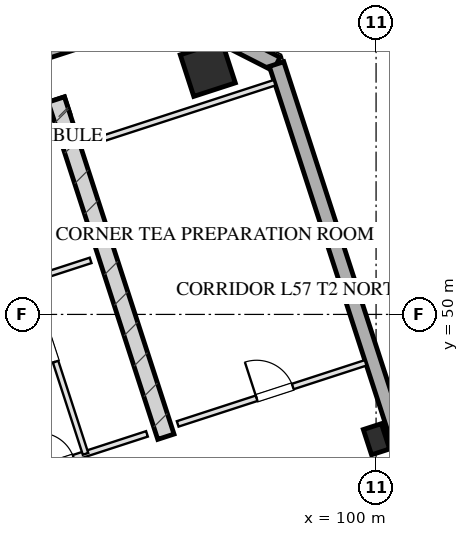
"""IFC4 building model, lengths in metres.
Left out: names, types, materials, properties, quantities, classifications, styles, units other than length and angle.
Written with IfcOpenShell. Run it as: python <this file> out.ifc"""

import sys

from ifc_helpers import new_model, si_unit, direction, frame, frame_2d, origin, origin_2d, place, context, subcontext, project, spatial, rectangle, hollow_rectangle, extrude, element, fill, save


model = new_model("IFC4")
c1 = context("Model", 3, precision=1e-05, world=origin(), true_north=direction((0.0, 1.0)))
c2 = subcontext(c1, "Body", "Model", "MODEL_VIEW")
j1 = project(units=[si_unit("LENGTHUNIT", "METRE"), si_unit("PLANEANGLEUNIT", "RADIAN")], contexts=[c1])
p1 = place(None, origin())
s1 = spatial("IfcSite", under=j1, at=p1, CompositionType="ELEMENT")
p2 = place(p1, origin())
s2 = spatial("IfcBuilding", under=s1, at=p2, CompositionType="ELEMENT")
p3 = place(p2, frame((0.0, 0.0, 212.75)))
s3 = spatial("IfcBuildingStorey", under=s2, at=p3, CompositionType="ELEMENT", Elevation=212.75)
p4 = place(p3, frame((76.415, 50.489, 0.0), z_axis=(0.0, 0.0, 1.0), x_axis=(0.951056810414, 0.309016089169, 0.0)))
e1 = element("IfcWall", 1, at=p4, inside=s3, PredefinedType="SHEAR", context=c2, shape_type="SweptSolid", body=[
    extrude(rectangle(XDim=16.25, YDim=0.45, at=frame_2d((8.125, 0.0))), origin(), (0.0, 0.0, 1.0), 3.45),
])
p5 = place(p3, frame((94.469, 46.781, 0.0), z_axis=(0.0, 0.0, 1.0), x_axis=(-0.309004419953, 0.951060601881, 0.0)))
e2 = element("IfcWall", 2, at=p5, inside=s3, PredefinedType="SHEAR", context=c2, shape_type="SweptSolid", body=[
    extrude(rectangle(XDim=9.33, YDim=0.45, at=frame_2d((4.665, 0.0))), origin(), (0.0, 0.0, 1.0), 3.45),
])
p6 = place(p3, frame((95.572, 56.461, 0.0), z_axis=(0.0, 0.0, 1.0), x_axis=(0.951056516295, 0.309016994375, 0.0)))
e3 = element("IfcColumn", 3, at=p6, inside=s3, PredefinedType="COLUMN", context=c2, shape_type="SweptSolid", body=[
    extrude(hollow_rectangle(XDim=1.15, YDim=1.15, WallThickness=0.04, at=origin_2d()), origin(), (0.0, 0.0, 1.0), 3.451),
])
p7 = place(p3, frame((100.01, 46.716, 0.0), z_axis=(0.0, 0.0, 1.0), x_axis=(0.951056516295, 0.309016994375, 0.0)))
e4 = element("IfcColumn", 4, at=p7, inside=s3, PredefinedType="COLUMN", context=c2, shape_type="SweptSolid", body=[
    extrude(hollow_rectangle(XDim=0.5, YDim=0.7, WallThickness=0.025, at=origin_2d()), origin(), (0.0, 0.0, 1.0), 3.451),
])
p8 = place(p3, frame((72.165, 50.706, 0.0), z_axis=(0.0, 0.0, 1.0), x_axis=(0.951058012937, 0.309012388148, 0.0)))
e5 = element("IfcWall", 5, at=p8, inside=s3, PredefinedType="SOLIDWALL", context=c2, shape_type="SweptSolid", body=[
    extrude(rectangle(XDim=23.6, YDim=0.4, at=frame_2d((11.8, 0.0))), origin(), (0.0, 0.0, 1.0), 2.55),
])
p9 = place(p3, frame((94.61, 57.999, 0.0), z_axis=(0.0, 0.0, 1.0), x_axis=(0.890979603174, -0.454043331334, 0.0)))
e6 = element("IfcWall", 6, at=p9, inside=s3, PredefinedType="SOLIDWALL", context=c2, shape_type="SweptSolid", body=[
    extrude(rectangle(XDim=3.111, YDim=0.4, at=frame_2d((1.556, 0.0))), origin(), (0.0, 0.0, 1.0), 2.55),
])
p10 = place(p3, frame((97.382, 56.586, 0.0), z_axis=(0.0, 0.0, 1.0), x_axis=(0.309016491071, -0.951056679828, 0.0)))
e7 = element("IfcWall", 7, at=p10, inside=s3, PredefinedType="SOLIDWALL", context=c2, shape_type="SweptSolid", body=[
    extrude(rectangle(XDim=38.4, YDim=0.4, at=frame_2d((19.2, 0.0))), origin(), (0.0, 0.0, 1.0), 2.55),
])
p11 = place(p10, frame((24.55, 0.0, 0.75)))
e8 = element("IfcOpeningElement", 8, at=p11, cuts=e7, PredefinedType="OPENING", context=c2, shape_type="SweptSolid", body=[
    extrude(rectangle(XDim=2.1, YDim=1.4, at=frame_2d((1.05, 0.7))), frame((0.0, 0.21, 0.0), z_axis=(0.0, -1.0, 0.0), x_axis=(1.0, 0.0, 0.0)), (0.0, 0.0, 1.0), 0.42),
])
p12 = place(p10, frame((20.75, 0.0, 0.75)))
e9 = element("IfcOpeningElement", 9, at=p12, cuts=e7, PredefinedType="OPENING", context=c2, shape_type="SweptSolid", body=[
    extrude(rectangle(XDim=2.1, YDim=1.4, at=frame_2d((1.05, 0.7))), frame((0.0, 0.21, 0.0), z_axis=(0.0, -1.0, 0.0), x_axis=(1.0, 0.0, 0.0)), (0.0, 0.0, 1.0), 0.42),
])
p13 = place(p10, frame((15.55, 0.0, 0.75)))
e10 = element("IfcOpeningElement", 10, at=p13, cuts=e7, PredefinedType="OPENING", context=c2, shape_type="SweptSolid", body=[
    extrude(rectangle(XDim=2.1, YDim=1.4, at=frame_2d((1.05, 0.7))), frame((0.0, 0.21, 0.0), z_axis=(0.0, -1.0, 0.0), x_axis=(1.0, 0.0, 0.0)), (0.0, 0.0, 1.0), 0.42),
])
p14 = place(p10, frame((11.75, 0.0, 0.75)))
e11 = element("IfcOpeningElement", 11, at=p14, cuts=e7, PredefinedType="OPENING", context=c2, shape_type="SweptSolid", body=[
    extrude(rectangle(XDim=2.1, YDim=1.4, at=frame_2d((1.05, 0.7))), frame((0.0, 0.21, 0.0), z_axis=(0.0, -1.0, 0.0), x_axis=(1.0, 0.0, 0.0)), (0.0, 0.0, 1.0), 0.42),
])
p15 = place(p3, frame((90.928, 45.868, 0.0), z_axis=(0.0, 0.0, 1.0), x_axis=(0.951059297078, 0.309008435874, 0.0)))
e12 = element("IfcWall", 12, at=p15, inside=s3, PredefinedType="PARTITIONING", context=c2, shape_type="SweptSolid", body=[
    extrude(rectangle(XDim=3.2, YDim=0.15, at=frame_2d((1.6, 0.0))), origin(), (0.0, 0.0, 1.0), 3.155),
])
p16 = place(p15, frame((0.22, 0.0, 0.0)))
e13 = element("IfcOpeningElement", 13, at=p16, cuts=e12, PredefinedType="OPENING", context=c2, shape_type="SweptSolid", body=[
    extrude(rectangle(XDim=0.95, YDim=2.05, at=frame_2d((0.475, 1.025))), frame((0.0, 0.085, 0.0), z_axis=(0.0, -1.0, 0.0), x_axis=(1.0, 0.0, 0.0)), (0.0, 0.0, 1.0), 0.17),
])
p17 = place(p3, frame((92.355, 46.331, 0.0), z_axis=(0.0, 0.0, 1.0), x_axis=(-0.309007490203, 0.951059604335, 0.0)))
e14 = element("IfcWall", 14, at=p17, inside=s3, PredefinedType="PARTITIONING", context=c2, shape_type="SweptSolid", body=[
    extrude(rectangle(XDim=8.43, YDim=0.15, at=frame_2d((4.215, 0.0))), origin(), (0.0, 0.0, 1.0), 3.155),
])
p18 = place(p17, frame((2.55, 0.0, 0.0)))
e15 = element("IfcOpeningElement", 15, at=p18, cuts=e14, PredefinedType="OPENING", context=c2, shape_type="SweptSolid", body=[
    extrude(rectangle(XDim=0.95, YDim=2.05, at=frame_2d((0.475, 1.025))), frame((0.0, 0.085, 0.0), z_axis=(0.0, -1.0, 0.0), x_axis=(1.0, 0.0, 0.0)), (0.0, 0.0, 1.0), 0.17),
])
p19 = place(p17, frame((5.8, 0.0, 0.0)))
e16 = element("IfcOpeningElement", 16, at=p19, cuts=e14, PredefinedType="OPENING", context=c2, shape_type="SweptSolid", body=[
    extrude(rectangle(XDim=0.9, YDim=2.05, at=frame_2d((0.45, 1.025))), frame((0.0, 0.085, 0.0), z_axis=(0.0, -1.0, 0.0), x_axis=(1.0, 0.0, 0.0)), (0.0, 0.0, 1.0), 0.17),
])
p20 = place(p3, frame((90.871, 50.896, 0.0), z_axis=(0.0, 0.0, 1.0), x_axis=(0.951054116971, 0.309024378638, 0.0)))
e17 = element("IfcWall", 17, at=p20, inside=s3, PredefinedType="PARTITIONING", context=c2, shape_type="SweptSolid", body=[
    extrude(rectangle(XDim=1.7, YDim=0.15, at=frame_2d((0.85, 0.0))), origin(), (0.0, 0.0, 1.0), 3.155),
])
p21 = place(p3, frame((92.385, 54.49, 0.0), z_axis=(0.0, 0.0, 1.0), x_axis=(0.951055112834, 0.309021313752, 0.0)))
e18 = element("IfcWall", 18, at=p21, inside=s3, PredefinedType="PARTITIONING", context=c2, shape_type="SweptSolid", body=[
    extrude(rectangle(XDim=5.2, YDim=0.15, at=frame_2d((2.6, 0.0))), origin(), (0.0, 0.0, 1.0), 3.155),
])
p22 = place(p3, frame((94.78, 47.119, 0.0), z_axis=(0.0, 0.0, 1.0), x_axis=(0.951055112834, 0.309021313752, 0.0)))
e19 = element("IfcWall", 19, at=p22, inside=s3, PredefinedType="PARTITIONING", context=c2, shape_type="SweptSolid", body=[
    extrude(rectangle(XDim=5.2, YDim=0.15, at=frame_2d((2.6, 0.0))), origin(), (0.0, 0.0, 1.0), 3.155),
])
p23 = place(p22, frame((2.184, 0.0, 0.0)))
e20 = element("IfcOpeningElement", 20, at=p23, cuts=e19, PredefinedType="OPENING", context=c2, shape_type="SweptSolid", body=[
    extrude(rectangle(XDim=1.0, YDim=2.05, at=frame_2d((0.5, 1.025))), frame((0.0, 0.085, 0.0), z_axis=(0.0, -1.0, 0.0), x_axis=(1.0, 0.0, 0.0)), (0.0, 0.0, 1.0), 0.17),
])
p24 = place(p16, origin())
e21 = element("IfcDoor", 21, at=p24, inside=s3, OperationType="SINGLE_SWING_LEFT", PredefinedType="DOOR", context=c2, shape_type="SweptSolid", body=[
    extrude(rectangle(XDim=0.95, YDim=2.05, at=frame_2d((0.475, 1.025))), frame((0.0, 0.025, 0.0), z_axis=(0.0, -1.0, 0.0), x_axis=(1.0, 0.0, 0.0)), (0.0, 0.0, 1.0), 0.05),
])
fill(e13, e21)
p25 = place(p18, origin())
e22 = element("IfcDoor", 22, at=p25, inside=s3, OperationType="SINGLE_SWING_LEFT", PredefinedType="DOOR", context=c2, shape_type="SweptSolid", body=[
    extrude(rectangle(XDim=0.95, YDim=2.05, at=frame_2d((0.475, 1.025))), frame((0.0, 0.025, 0.0), z_axis=(0.0, -1.0, 0.0), x_axis=(1.0, 0.0, 0.0)), (0.0, 0.0, 1.0), 0.05),
])
fill(e15, e22)
p26 = place(p23, origin())
e23 = element("IfcDoor", 23, at=p26, inside=s3, OperationType="SINGLE_SWING_LEFT", PredefinedType="DOOR", context=c2, shape_type="SweptSolid", body=[
    extrude(rectangle(XDim=1.0, YDim=2.05, at=frame_2d((0.5, 1.025))), frame((0.0, 0.025, 0.0), z_axis=(0.0, -1.0, 0.0), x_axis=(1.0, 0.0, 0.0)), (0.0, 0.0, 1.0), 0.05),
])
fill(e20, e23)
save(model, sys.argv[1])
